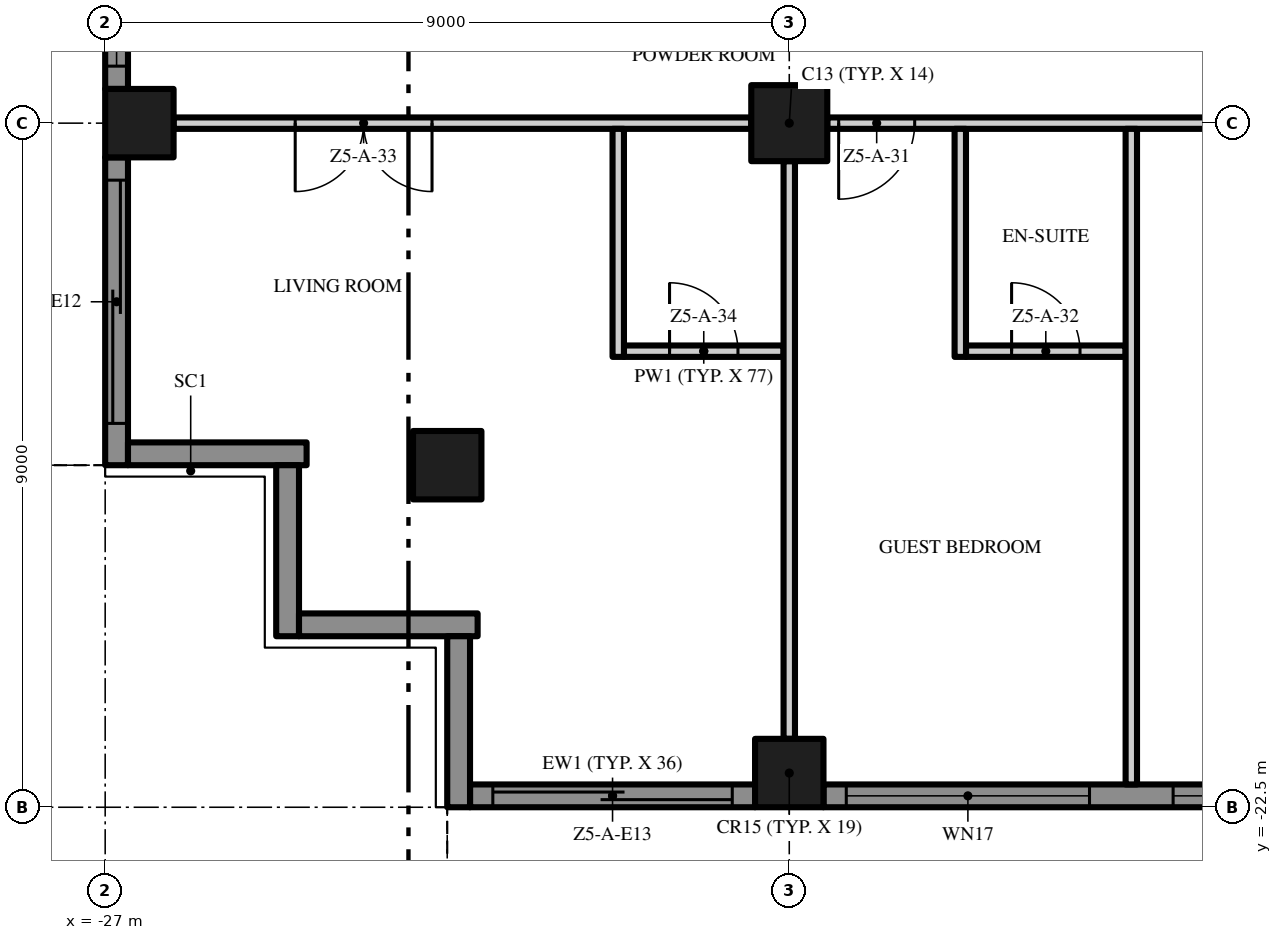
"""IFC4 building model, lengths in metres.
Left out: names, types, materials, properties, quantities, classifications, styles, units other than length and angle.
Written with IfcOpenShell. Run it as: python <this file> out.ifc"""

import sys

from ifc_helpers import new_model, si_unit, direction, frame, frame_2d, origin, origin_2d, place, context, subcontext, project, spatial, polyline, rectangle, outline, extrude, element, fill, save


model = new_model("IFC4")
c1 = context("Model", 3, precision=1e-05, world=origin(), true_north=direction((0.0, 1.0)))
c2 = subcontext(c1, "Body", "Model", "MODEL_VIEW")
j1 = project(units=[si_unit("LENGTHUNIT", "METRE"), si_unit("PLANEANGLEUNIT", "RADIAN")], contexts=[c1])
p1 = place(None, origin())
s1 = spatial("IfcSite", under=j1, at=p1, CompositionType="ELEMENT")
p2 = place(p1, origin())
s2 = spatial("IfcBuilding", under=s1, at=p2, CompositionType="ELEMENT")
p3 = place(p2, frame((0.0, 0.0, 242.6)))
s3 = spatial("IfcBuildingStorey", under=s2, at=p3, CompositionType="ELEMENT", Elevation=242.6)
p4 = place(p3, frame((-18.0, -13.5, 0.0), z_axis=(0.0, 0.0, 1.0), x_axis=(1.0, 0.0, 0.0)))
e1 = element("IfcColumn", 1, at=p4, inside=s3, PredefinedType="COLUMN", context=c2, shape_type="SweptSolid", body=[
    extrude(rectangle(XDim=1.0, YDim=1.0, at=origin_2d()), origin(), (0.0, 0.0, 1.0), 3.5),
])
for number, where, z_axis, x_axis in (
    (2, (-18.0, -22.05, 0.0), (0.0, 0.0, 1.0), (1.0, 0.0, 0.0)),
    (3, (-26.55, -13.5, 0.0), (0.0, 0.0, 1.0), (1.0, 0.0, 0.0)),
    (4, (-22.5, -18.0, 0.0), (0.0, 0.0, 1.0), (1.0, 0.0, 0.0)),
):
    element("IfcColumn", number, at=place(p3, frame(where, z_axis=z_axis, x_axis=x_axis)), inside=s3, PredefinedType="COLUMN", context=c2, shape_type="SweptSolid", body=[
        extrude(rectangle(XDim=0.9, YDim=0.9, at=origin_2d()), origin(), (0.0, 0.0, 1.0), 3.5),
    ])
p5 = place(p3, frame((-18.45, -22.35, 0.0), z_axis=(0.0, 0.0, 1.0), x_axis=(-1.0, 0.0, 0.0)))
e5 = element("IfcWall", 5, at=p5, inside=s3, PredefinedType="SOLIDWALL", context=c2, shape_type="SweptSolid", body=[
    extrude(rectangle(XDim=3.75, YDim=0.3, at=frame_2d((1.875, 0.0))), origin(), (0.0, 0.0, 1.0), 3.5),
])
p6 = place(p5, frame((0.3, 0.0, 0.0)))
e6 = element("IfcOpeningElement", 6, at=p6, cuts=e5, PredefinedType="OPENING", context=c2, shape_type="SweptSolid", body=[
    extrude(rectangle(XDim=3.15, YDim=2.4, at=frame_2d((1.575, 1.2))), frame((0.0, 0.16, 0.0), z_axis=(0.0, -1.0, 0.0), x_axis=(1.0, 0.0, 0.0)), (0.0, 0.0, 1.0), 0.32),
])
p7 = place(p3, frame((-9.45, -22.35, 0.0), z_axis=(0.0, 0.0, 1.0), x_axis=(-1.0, 0.0, 0.0)))
e7 = element("IfcWall", 7, at=p7, inside=s3, PredefinedType="SOLIDWALL", context=c2, shape_type="SweptSolid", body=[
    extrude(rectangle(XDim=8.1, YDim=0.3, at=frame_2d((4.05, 0.0))), origin(), (0.0, 0.0, 1.0), 3.5),
])
p8 = place(p7, frame((4.6, 0.0, 0.45)))
e8 = element("IfcOpeningElement", 8, at=p8, cuts=e7, PredefinedType="OPENING", context=c2, shape_type="SweptSolid", body=[
    extrude(rectangle(XDim=3.2, YDim=2.65, at=frame_2d((1.6, 1.325))), frame((0.0, 0.16, 0.0), z_axis=(0.0, -1.0, 0.0), x_axis=(1.0, 0.0, 0.0)), (0.0, 0.0, 1.0), 0.32),
])
p9 = place(p7, frame((0.3, 0.0, 0.45)))
e9 = element("IfcOpeningElement", 9, at=p9, cuts=e7, PredefinedType="OPENING", context=c2, shape_type="SweptSolid", body=[
    extrude(rectangle(XDim=3.2, YDim=2.65, at=frame_2d((1.6, 1.325))), frame((0.0, 0.16, 0.0), z_axis=(0.0, -1.0, 0.0), x_axis=(1.0, 0.0, 0.0)), (0.0, 0.0, 1.0), 0.32),
])
p10 = place(p3, frame((-26.85, -13.05, 0.0), z_axis=(0.0, 0.0, 1.0), x_axis=(0.0, 1.0, 0.0)))
e10 = element("IfcWall", 10, at=p10, inside=s3, PredefinedType="SOLIDWALL", context=c2, shape_type="SweptSolid", body=[
    extrude(rectangle(XDim=8.1, YDim=0.3, at=frame_2d((4.05, 0.0))), origin(), (0.0, 0.0, 1.0), 3.5),
])
p11 = place(p10, frame((4.6, 0.0, 0.45)))
e11 = element("IfcOpeningElement", 11, at=p11, cuts=e10, PredefinedType="OPENING", context=c2, shape_type="SweptSolid", body=[
    extrude(rectangle(XDim=3.2, YDim=2.65, at=frame_2d((1.6, 1.325))), frame((0.0, 0.16, 0.0), z_axis=(0.0, -1.0, 0.0), x_axis=(1.0, 0.0, 0.0)), (0.0, 0.0, 1.0), 0.32),
])
p12 = place(p10, frame((0.3, 0.0, 0.45)))
e12 = element("IfcOpeningElement", 12, at=p12, cuts=e10, PredefinedType="OPENING", context=c2, shape_type="SweptSolid", body=[
    extrude(rectangle(XDim=3.2, YDim=2.65, at=frame_2d((1.6, 1.325))), frame((0.0, 0.16, 0.0), z_axis=(0.0, -1.0, 0.0), x_axis=(1.0, 0.0, 0.0)), (0.0, 0.0, 1.0), 0.32),
])
p13 = place(p3, frame((-26.85, -18.0, 0.0), z_axis=(0.0, 0.0, 1.0), x_axis=(0.0, 1.0, 0.0)))
e13 = element("IfcWall", 13, at=p13, inside=s3, PredefinedType="SOLIDWALL", context=c2, shape_type="SweptSolid", body=[
    extrude(rectangle(XDim=4.05, YDim=0.3, at=frame_2d((2.025, 0.0))), origin(), (0.0, 0.0, 1.0), 3.5),
])
p14 = place(p13, frame((0.55, 0.0, 0.0)))
e14 = element("IfcOpeningElement", 14, at=p14, cuts=e13, PredefinedType="OPENING", context=c2, shape_type="SweptSolid", body=[
    extrude(rectangle(XDim=3.2, YDim=2.4, at=frame_2d((1.6, 1.2))), frame((0.0, 0.16, 0.0), z_axis=(0.0, -1.0, 0.0), x_axis=(1.0, 0.0, 0.0)), (0.0, 0.0, 1.0), 0.32),
])
p15 = place(p3, frame((-24.35, -17.85, 0.0), z_axis=(0.0, 0.0, 1.0), x_axis=(-1.0, 0.0, 0.0)))
e15 = element("IfcWall", 15, at=p15, inside=s3, PredefinedType="SOLIDWALL", context=c2, shape_type="SweptSolid", body=[
    extrude(rectangle(XDim=2.35, YDim=0.3, at=frame_2d((1.175, 0.0))), origin(), (0.0, 0.0, 1.0), 3.5),
])
p16 = place(p3, frame((-24.6, -20.25, 0.0), z_axis=(0.0, 0.0, 1.0), x_axis=(0.0, 1.0, 0.0)))
e16 = element("IfcWall", 16, at=p16, inside=s3, PredefinedType="SOLIDWALL", context=c2, shape_type="SweptSolid", body=[
    extrude(rectangle(XDim=2.25, YDim=0.3, at=frame_2d((1.125, 0.0))), origin(), (0.0, 0.0, 1.0), 3.5),
])
p17 = place(p3, frame((-22.1, -20.1, 0.0), z_axis=(0.0, 0.0, 1.0), x_axis=(-1.0, 0.0, 0.0)))
e17 = element("IfcWall", 17, at=p17, inside=s3, PredefinedType="SOLIDWALL", context=c2, shape_type="SweptSolid", body=[
    extrude(rectangle(XDim=2.35, YDim=0.3, at=frame_2d((1.175, 0.0))), origin(), (0.0, 0.0, 1.0), 3.5),
])
p18 = place(p3, frame((-22.35, -22.5, 0.0), z_axis=(0.0, 0.0, 1.0), x_axis=(0.0, 1.0, 0.0)))
e18 = element("IfcWall", 18, at=p18, inside=s3, PredefinedType="SOLIDWALL", context=c2, shape_type="SweptSolid", body=[
    extrude(rectangle(XDim=2.25, YDim=0.3, at=frame_2d((1.125, 0.0))), origin(), (0.0, 0.0, 1.0), 3.5),
])
p19 = place(p3, origin())
e19 = element("IfcWall", 19, at=p19, inside=s3, PredefinedType="USERDEFINED", context=c2, shape_type="SweptSolid", body=[
    extrude(outline(polyline([(-22.5, -24.3), (-21.0, -25.005), (-19.5, -25.441), (-18.75, -25.5), (-18.0, -25.441), (-16.5, -25.005), (-15.0, -24.3), (-13.5, -23.595), (-12.0, -23.159), (-11.25, -23.1), (-10.5, -23.159), (-9.0, -23.595), (-7.5, -24.3), (-6.0, -25.005), (-4.5, -25.441), (-3.75, -25.5), (-3.0, -25.441), (-1.5, -25.005), (0.0, -24.3), (1.5, -23.595), (3.0, -23.159), (3.75, -23.1), (4.5, -23.159), (6.0, -23.595), (7.5, -24.3), (9.0, -25.005), (10.5, -25.441), (11.25, -25.5), (12.0, -25.441), (13.5, -25.005), (15.0, -24.3), (16.5, -23.595), (18.0, -23.159), (18.75, -23.1), (19.5, -23.159), (21.0, -23.595), (22.5, -24.3), (22.606, -24.074), (21.089, -23.36), (19.545, -22.911), (18.75, -22.849), (17.955, -22.911), (16.411, -23.36), (14.894, -24.074), (13.411, -24.771), (11.955, -25.194), (11.25, -25.249), (10.545, -25.194), (9.089, -24.771), (7.606, -24.074), (6.089, -23.36), (4.545, -22.911), (3.75, -22.849), (2.955, -22.911), (1.411, -23.36), (-0.106, -24.074), (-1.589, -24.771), (-3.045, -25.194), (-3.75, -25.249), (-4.455, -25.194), (-5.911, -24.771), (-7.394, -24.074), (-8.911, -23.36), (-10.455, -22.911), (-11.25, -22.849), (-12.045, -22.911), (-13.589, -23.36), (-15.106, -24.074), (-16.589, -24.771), (-18.045, -25.194), (-18.75, -25.249), (-19.455, -25.194), (-20.911, -24.771), (-22.394, -24.074), (-22.5, -24.3)])), origin(), (0.0, 0.0, 1.0), 0.9),
])
p20 = place(p3, origin())
e20 = element("IfcWall", 20, at=p20, inside=s3, PredefinedType="USERDEFINED", context=c2, shape_type="SweptSolid", body=[
    extrude(outline(polyline([(-28.8, 18.0), (-29.505, 16.5), (-29.941, 15.0), (-30.0, 14.25), (-29.941, 13.5), (-29.505, 12.0), (-28.8, 10.5), (-28.095, 9.0), (-27.659, 7.5), (-27.6, 6.75), (-27.659, 6.0), (-28.095, 4.5), (-28.8, 3.0), (-29.505, 1.5), (-29.941, 0.0), (-30.0, -0.75), (-29.941, -1.5), (-29.505, -3.0), (-28.8, -4.5), (-28.095, -6.0), (-27.659, -7.5), (-27.6, -8.25), (-27.659, -9.0), (-28.095, -10.5), (-28.8, -12.0), (-29.505, -13.5), (-29.941, -15.0), (-30.0, -15.75), (-29.941, -16.5), (-29.505, -18.0), (-29.265, -17.93), (-29.694, -16.455), (-29.749, -15.75), (-29.694, -15.045), (-29.271, -13.589), (-28.574, -12.106), (-27.86, -10.589), (-27.411, -9.045), (-27.349, -8.25), (-27.411, -7.455), (-27.86, -5.911), (-28.574, -4.394), (-29.271, -2.911), (-29.694, -1.455), (-29.749, -0.75), (-29.694, -0.045), (-29.271, 1.411), (-28.574, 2.894), (-27.86, 4.411), (-27.411, 5.955), (-27.349, 6.75), (-27.411, 7.545), (-27.86, 9.089), (-28.574, 10.606), (-29.271, 12.089), (-29.694, 13.545), (-29.749, 14.25), (-29.694, 14.955), (-29.271, 16.411), (-28.574, 17.894), (-28.8, 18.0)])), origin(), (0.0, 0.0, 1.0), 0.9),
])
p21 = place(p3, frame((-20.175, -16.5, 0.0), z_axis=(0.0, 0.0, 1.0), x_axis=(1.0, 0.0, 0.0)))
e21 = element("IfcWall", 21, at=p21, inside=s3, PredefinedType="PARTITIONING", context=c2, shape_type="SweptSolid", body=[
    extrude(rectangle(XDim=2.1, YDim=0.15, at=frame_2d((1.05, 0.0))), origin(), (0.0, 0.0, 1.0), 3.5),
])
p22 = place(p21, frame((0.6, 0.0, 0.0)))
e22 = element("IfcOpeningElement", 22, at=p22, cuts=e21, PredefinedType="OPENING", context=c2, shape_type="SweptSolid", body=[
    extrude(rectangle(XDim=0.9, YDim=2.1, at=frame_2d((0.45, 1.05))), frame((0.0, 0.085, 0.0), z_axis=(0.0, -1.0, 0.0), x_axis=(1.0, 0.0, 0.0)), (0.0, 0.0, 1.0), 0.17),
])
p23 = place(p3, frame((-15.675, -16.5, 0.0), z_axis=(0.0, 0.0, 1.0), x_axis=(1.0, 0.0, 0.0)))
e23 = element("IfcWall", 23, at=p23, inside=s3, PredefinedType="PARTITIONING", context=c2, shape_type="SweptSolid", body=[
    extrude(rectangle(XDim=2.1, YDim=0.15, at=frame_2d((1.05, 0.0))), origin(), (0.0, 0.0, 1.0), 3.5),
])
p24 = place(p23, frame((0.6, 0.0, 0.0)))
e24 = element("IfcOpeningElement", 24, at=p24, cuts=e23, PredefinedType="OPENING", context=c2, shape_type="SweptSolid", body=[
    extrude(rectangle(XDim=0.9, YDim=2.1, at=frame_2d((0.45, 1.05))), frame((0.0, 0.085, 0.0), z_axis=(0.0, -1.0, 0.0), x_axis=(1.0, 0.0, 0.0)), (0.0, 0.0, 1.0), 0.17),
])
p25 = place(p3, frame((-18.5, -13.5, 0.0), z_axis=(0.0, 0.0, 1.0), x_axis=(-1.0, 0.0, 0.0)))
e25 = element("IfcWall", 25, at=p25, inside=s3, PredefinedType="PARTITIONING", context=c2, shape_type="SweptSolid", body=[
    extrude(rectangle(XDim=7.6, YDim=0.15, at=frame_2d((3.8, 0.0))), origin(), (0.0, 0.0, 1.0), 3.5),
])
p26 = place(p25, frame((4.2, 0.0, 0.0)))
e26 = element("IfcOpeningElement", 26, at=p26, cuts=e25, PredefinedType="OPENING", context=c2, shape_type="SweptSolid", body=[
    extrude(rectangle(XDim=1.8, YDim=2.4, at=frame_2d((0.9, 1.2))), frame((0.0, 0.085, 0.0), z_axis=(0.0, -1.0, 0.0), x_axis=(1.0, 0.0, 0.0)), (0.0, 0.0, 1.0), 0.17),
])
p27 = place(p3, frame((-9.5, -13.5, 0.0), z_axis=(0.0, 0.0, 1.0), x_axis=(-1.0, 0.0, 0.0)))
e27 = element("IfcWall", 27, at=p27, inside=s3, PredefinedType="PARTITIONING", context=c2, shape_type="SweptSolid", body=[
    extrude(rectangle(XDim=8.0, YDim=0.15, at=frame_2d((4.0, 0.0))), origin(), (0.0, 0.0, 1.0), 3.5),
])
p28 = place(p27, frame((1.25, 0.0, 0.0)))
e28 = element("IfcOpeningElement", 28, at=p28, cuts=e27, PredefinedType="OPENING", context=c2, shape_type="SweptSolid", body=[
    extrude(rectangle(XDim=1.0, YDim=2.4, at=frame_2d((0.5, 1.2))), frame((0.0, 0.085, 0.0), z_axis=(0.0, -1.0, 0.0), x_axis=(1.0, 0.0, 0.0)), (0.0, 0.0, 1.0), 0.17),
])
p29 = place(p27, frame((6.85, 0.0, 0.0)))
e29 = element("IfcOpeningElement", 29, at=p29, cuts=e27, PredefinedType="OPENING", context=c2, shape_type="SweptSolid", body=[
    extrude(rectangle(XDim=1.0, YDim=2.4, at=frame_2d((0.5, 1.2))), frame((0.0, 0.085, 0.0), z_axis=(0.0, -1.0, 0.0), x_axis=(1.0, 0.0, 0.0)), (0.0, 0.0, 1.0), 0.17),
])
p30 = place(p3, frame((-20.25, -16.575, 0.0), z_axis=(0.0, 0.0, 1.0), x_axis=(0.0, 1.0, 0.0)))
e30 = element("IfcWall", 30, at=p30, inside=s3, PredefinedType="PARTITIONING", context=c2, shape_type="SweptSolid", body=[
    extrude(rectangle(XDim=3.0, YDim=0.15, at=frame_2d((1.5, 0.0))), origin(), (0.0, 0.0, 1.0), 3.5),
])
p31 = place(p3, frame((-18.0, -21.6, 0.0), z_axis=(0.0, 0.0, 1.0), x_axis=(0.0, 1.0, 0.0)))
e31 = element("IfcWall", 31, at=p31, inside=s3, PredefinedType="PARTITIONING", context=c2, shape_type="SweptSolid", body=[
    extrude(rectangle(XDim=7.6, YDim=0.15, at=frame_2d((3.8, 0.0))), origin(), (0.0, 0.0, 1.0), 3.5),
])
p32 = place(p3, frame((-15.75, -16.575, 0.0), z_axis=(0.0, 0.0, 1.0), x_axis=(0.0, 1.0, 0.0)))
e32 = element("IfcWall", 32, at=p32, inside=s3, PredefinedType="PARTITIONING", context=c2, shape_type="SweptSolid", body=[
    extrude(rectangle(XDim=3.0, YDim=0.15, at=frame_2d((1.5, 0.0))), origin(), (0.0, 0.0, 1.0), 3.5),
])
p33 = place(p3, frame((-13.5, -22.2, 0.0), z_axis=(0.0, 0.0, 1.0), x_axis=(0.0, 1.0, 0.0)))
e33 = element("IfcWall", 33, at=p33, inside=s3, PredefinedType="PARTITIONING", context=c2, shape_type="SweptSolid", body=[
    extrude(rectangle(XDim=8.625, YDim=0.15, at=frame_2d((4.312, 0.0))), origin(), (0.0, 0.0, 1.0), 3.5),
])
p34 = place(p6, origin())
e34 = element("IfcDoor", 34, at=p34, inside=s3, OperationType="SINGLE_SWING_LEFT", PredefinedType="DOOR", context=c2, shape_type="SweptSolid", body=[
    extrude(rectangle(XDim=3.15, YDim=2.4, at=frame_2d((1.575, 1.2))), frame((0.0, 0.025, 0.0), z_axis=(0.0, -1.0, 0.0), x_axis=(1.0, 0.0, 0.0)), (0.0, 0.0, 1.0), 0.05),
])
fill(e6, e34)
p35 = place(p8, origin())
e35 = element("IfcWindow", 35, at=p35, inside=s3, PartitioningType="SINGLE_PANEL", PredefinedType="WINDOW", context=c2, shape_type="SweptSolid", body=[
    extrude(rectangle(XDim=3.2, YDim=2.65, at=frame_2d((1.6, 1.325))), frame((0.0, 0.03, 0.0), z_axis=(0.0, -1.0, 0.0), x_axis=(1.0, 0.0, 0.0)), (0.0, 0.0, 1.0), 0.06),
])
fill(e8, e35)
p36 = place(p9, origin())
e36 = element("IfcWindow", 36, at=p36, inside=s3, PartitioningType="SINGLE_PANEL", PredefinedType="WINDOW", context=c2, shape_type="SweptSolid", body=[
    extrude(rectangle(XDim=3.2, YDim=2.65, at=frame_2d((1.6, 1.325))), frame((0.0, 0.03, 0.0), z_axis=(0.0, -1.0, 0.0), x_axis=(1.0, 0.0, 0.0)), (0.0, 0.0, 1.0), 0.06),
])
fill(e9, e36)
p37 = place(p12, origin())
e37 = element("IfcWindow", 37, at=p37, inside=s3, PartitioningType="SINGLE_PANEL", PredefinedType="WINDOW", context=c2, shape_type="SweptSolid", body=[
    extrude(rectangle(XDim=3.2, YDim=2.65, at=frame_2d((1.6, 1.325))), frame((0.0, 0.03, 0.0), z_axis=(0.0, -1.0, 0.0), x_axis=(1.0, 0.0, 0.0)), (0.0, 0.0, 1.0), 0.06),
])
fill(e12, e37)
p38 = place(p14, origin())
e38 = element("IfcDoor", 38, at=p38, inside=s3, OperationType="SINGLE_SWING_LEFT", PredefinedType="DOOR", context=c2, shape_type="SweptSolid", body=[
    extrude(rectangle(XDim=3.2, YDim=2.4, at=frame_2d((1.6, 1.2))), frame((0.0, 0.025, 0.0), z_axis=(0.0, -1.0, 0.0), x_axis=(1.0, 0.0, 0.0)), (0.0, 0.0, 1.0), 0.05),
])
fill(e14, e38)
p39 = place(p29, origin())
e39 = element("IfcDoor", 39, at=p39, inside=s3, OperationType="SINGLE_SWING_RIGHT", PredefinedType="DOOR", context=c2, shape_type="SweptSolid", body=[
    extrude(rectangle(XDim=1.0, YDim=2.4, at=frame_2d((0.5, 1.2))), frame((0.0, 0.025, 0.0), z_axis=(0.0, -1.0, 0.0), x_axis=(1.0, 0.0, 0.0)), (0.0, 0.0, 1.0), 0.05),
])
fill(e29, e39)
p40 = place(p24, origin())
e40 = element("IfcDoor", 40, at=p40, inside=s3, OperationType="SINGLE_SWING_LEFT", PredefinedType="DOOR", context=c2, shape_type="SweptSolid", body=[
    extrude(rectangle(XDim=0.9, YDim=2.1, at=frame_2d((0.45, 1.05))), frame((0.0, 0.025, 0.0), z_axis=(0.0, -1.0, 0.0), x_axis=(1.0, 0.0, 0.0)), (0.0, 0.0, 1.0), 0.05),
])
fill(e24, e40)
p41 = place(p26, origin())
e41 = element("IfcDoor", 41, at=p41, inside=s3, OperationType="DOUBLE_DOOR_SINGLE_SWING", PredefinedType="DOOR", context=c2, shape_type="SweptSolid", body=[
    extrude(rectangle(XDim=1.8, YDim=2.4, at=frame_2d((0.9, 1.2))), frame((0.0, 0.025, 0.0), z_axis=(0.0, -1.0, 0.0), x_axis=(1.0, 0.0, 0.0)), (0.0, 0.0, 1.0), 0.05),
])
fill(e26, e41)
p42 = place(p22, origin())
e42 = element("IfcDoor", 42, at=p42, inside=s3, OperationType="SINGLE_SWING_LEFT", PredefinedType="DOOR", context=c2, shape_type="SweptSolid", body=[
    extrude(rectangle(XDim=0.9, YDim=2.1, at=frame_2d((0.45, 1.05))), frame((0.0, 0.025, 0.0), z_axis=(0.0, -1.0, 0.0), x_axis=(1.0, 0.0, 0.0)), (0.0, 0.0, 1.0), 0.05),
])
fill(e22, e42)
save(model, sys.argv[1])
